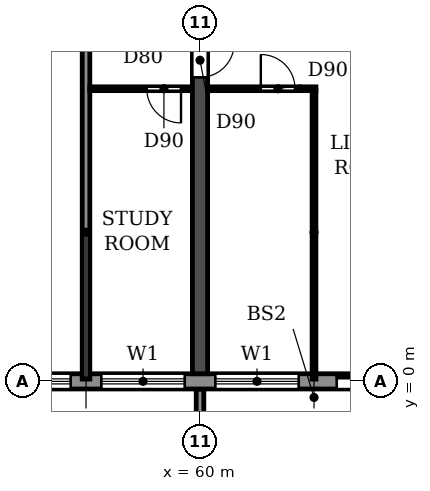
"""IFC4 building model, lengths in metres.
Left out: names, types, materials, properties, quantities, classifications, styles, units other than length and angle.
Written with IfcOpenShell. Run it as: python <this file> out.ifc"""

import sys

from ifc_helpers import new_model, si_unit, direction, frame, frame_2d, origin, place, context, subcontext, project, spatial, polyline, rectangle, outline, extrude, source, transform, mapped, element, fill, save


model = new_model("IFC4")
c1 = context("Model", 3, precision=1e-05, world=origin(), true_north=direction((0.0, 1.0)))
c2 = subcontext(c1, "Body", "Model", "MODEL_VIEW")
j1 = project(units=[si_unit("LENGTHUNIT", "METRE"), si_unit("PLANEANGLEUNIT", "RADIAN")], contexts=[c1])
p1 = place(None, origin())
s1 = spatial("IfcSite", under=j1, at=p1, CompositionType="ELEMENT")
p2 = place(p1, origin())
s2 = spatial("IfcBuilding", under=s1, at=p2, CompositionType="ELEMENT")
p3 = place(p2, frame((0.0, 0.0, 49.8)))
s3 = spatial("IfcBuildingStorey", under=s2, at=p3, CompositionType="ELEMENT", Elevation=49.8)
p4 = place(p3, frame((60.0, 0.2, 0.0), z_axis=(0.0, 0.0, 1.0), x_axis=(0.0, 1.0, 0.0)))
e1 = element("IfcWall", 1, at=p4, inside=s3, PredefinedType="SHEAR", context=c2, shape_type="SweptSolid", body=[
    extrude(rectangle(XDim=11.65, YDim=0.4, at=frame_2d((5.825, 0.0))), origin(), (0.0, 0.0, 1.0), 3.0),
])
p5 = place(p4, frame((7.8, 0.0, 0.0)))
e2 = element("IfcOpeningElement", 2, at=p5, cuts=e1, PredefinedType="OPENING", context=c2, shape_type="SweptSolid", body=[
    extrude(rectangle(XDim=0.9, YDim=2.1, at=frame_2d((0.45, 1.05))), frame((0.0, 0.21, 0.0), z_axis=(0.0, -1.0, 0.0), x_axis=(1.0, 0.0, 0.0)), (0.0, 0.0, 1.0), 0.42),
])
p6 = place(p3, frame((4.683, 0.0, 0.0), z_axis=(0.0, 0.0, 1.0), x_axis=(1.0, 0.0, 0.0)))
e3 = element("IfcWall", 3, at=p6, inside=s3, PredefinedType="STANDARD", context=c2, shape_type="SweptSolid", body=[
    extrude(rectangle(XDim=92.634, YDim=0.4, at=frame_2d((46.317, 0.0))), origin(), (0.0, 0.0, 1.0), 3.0),
])
p7 = place(p6, frame((1.717, 0.0, 0.9)))
e4 = element("IfcOpeningElement", 4, at=p7, cuts=e3, PredefinedType="OPENING", context=c2, shape_type="SweptSolid", body=[
    extrude(rectangle(XDim=2.2, YDim=1.5, at=frame_2d((1.1, 0.75))), frame((0.0, 0.21, 0.0), z_axis=(0.0, -1.0, 0.0), x_axis=(1.0, 0.0, 0.0)), (0.0, 0.0, 1.0), 0.42),
])
p8 = place(p6, frame((4.717, 0.0, 0.9)))
e5 = element("IfcOpeningElement", 5, at=p8, cuts=e3, PredefinedType="OPENING", context=c2, shape_type="SweptSolid", body=[
    extrude(rectangle(XDim=2.2, YDim=1.5, at=frame_2d((1.1, 0.75))), frame((0.0, 0.21, 0.0), z_axis=(0.0, -1.0, 0.0), x_axis=(1.0, 0.0, 0.0)), (0.0, 0.0, 1.0), 0.42),
])
p9 = place(p6, frame((7.717, 0.0, 0.9)))
e6 = element("IfcOpeningElement", 6, at=p9, cuts=e3, PredefinedType="OPENING", context=c2, shape_type="SweptSolid", body=[
    extrude(rectangle(XDim=2.2, YDim=1.5, at=frame_2d((1.1, 0.75))), frame((0.0, 0.21, 0.0), z_axis=(0.0, -1.0, 0.0), x_axis=(1.0, 0.0, 0.0)), (0.0, 0.0, 1.0), 0.42),
])
p10 = place(p6, frame((10.917, 0.0, 0.0)))
e7 = element("IfcOpeningElement", 7, at=p10, cuts=e3, PredefinedType="OPENING", context=c2, shape_type="SweptSolid", body=[
    extrude(rectangle(XDim=1.8, YDim=2.4, at=frame_2d((0.9, 1.2))), frame((0.0, 0.21, 0.0), z_axis=(0.0, -1.0, 0.0), x_axis=(1.0, 0.0, 0.0)), (0.0, 0.0, 1.0), 0.42),
])
p11 = place(p6, frame((13.717, 0.0, 0.9)))
e8 = element("IfcOpeningElement", 8, at=p11, cuts=e3, PredefinedType="OPENING", context=c2, shape_type="SweptSolid", body=[
    extrude(rectangle(XDim=2.2, YDim=1.5, at=frame_2d((1.1, 0.75))), frame((0.0, 0.21, 0.0), z_axis=(0.0, -1.0, 0.0), x_axis=(1.0, 0.0, 0.0)), (0.0, 0.0, 1.0), 0.42),
])
p12 = place(p6, frame((16.717, 0.0, 0.9)))
e9 = element("IfcOpeningElement", 9, at=p12, cuts=e3, PredefinedType="OPENING", context=c2, shape_type="SweptSolid", body=[
    extrude(rectangle(XDim=2.2, YDim=1.5, at=frame_2d((1.1, 0.75))), frame((0.0, 0.21, 0.0), z_axis=(0.0, -1.0, 0.0), x_axis=(1.0, 0.0, 0.0)), (0.0, 0.0, 1.0), 0.42),
])
p13 = place(p6, frame((19.917, 0.0, 0.0)))
e10 = element("IfcOpeningElement", 10, at=p13, cuts=e3, PredefinedType="OPENING", context=c2, shape_type="SweptSolid", body=[
    extrude(rectangle(XDim=1.8, YDim=2.4, at=frame_2d((0.9, 1.2))), frame((0.0, 0.21, 0.0), z_axis=(0.0, -1.0, 0.0), x_axis=(1.0, 0.0, 0.0)), (0.0, 0.0, 1.0), 0.42),
])
p14 = place(p6, frame((22.717, 0.0, 0.9)))
e11 = element("IfcOpeningElement", 11, at=p14, cuts=e3, PredefinedType="OPENING", context=c2, shape_type="SweptSolid", body=[
    extrude(rectangle(XDim=2.2, YDim=1.5, at=frame_2d((1.1, 0.75))), frame((0.0, 0.21, 0.0), z_axis=(0.0, -1.0, 0.0), x_axis=(1.0, 0.0, 0.0)), (0.0, 0.0, 1.0), 0.42),
])
p15 = place(p6, frame((25.717, 0.0, 0.9)))
e12 = element("IfcOpeningElement", 12, at=p15, cuts=e3, PredefinedType="OPENING", context=c2, shape_type="SweptSolid", body=[
    extrude(rectangle(XDim=2.2, YDim=1.5, at=frame_2d((1.1, 0.75))), frame((0.0, 0.21, 0.0), z_axis=(0.0, -1.0, 0.0), x_axis=(1.0, 0.0, 0.0)), (0.0, 0.0, 1.0), 0.42),
])
p16 = place(p6, frame((28.717, 0.0, 0.9)))
e13 = element("IfcOpeningElement", 13, at=p16, cuts=e3, PredefinedType="OPENING", context=c2, shape_type="SweptSolid", body=[
    extrude(rectangle(XDim=2.2, YDim=1.5, at=frame_2d((1.1, 0.75))), frame((0.0, 0.21, 0.0), z_axis=(0.0, -1.0, 0.0), x_axis=(1.0, 0.0, 0.0)), (0.0, 0.0, 1.0), 0.42),
])
p17 = place(p6, frame((31.717, 0.0, 0.9)))
e14 = element("IfcOpeningElement", 14, at=p17, cuts=e3, PredefinedType="OPENING", context=c2, shape_type="SweptSolid", body=[
    extrude(rectangle(XDim=2.2, YDim=1.5, at=frame_2d((1.1, 0.75))), frame((0.0, 0.21, 0.0), z_axis=(0.0, -1.0, 0.0), x_axis=(1.0, 0.0, 0.0)), (0.0, 0.0, 1.0), 0.42),
])
p18 = place(p6, frame((34.917, 0.0, 0.0)))
e15 = element("IfcOpeningElement", 15, at=p18, cuts=e3, PredefinedType="OPENING", context=c2, shape_type="SweptSolid", body=[
    extrude(rectangle(XDim=1.8, YDim=2.4, at=frame_2d((0.9, 1.2))), frame((0.0, 0.21, 0.0), z_axis=(0.0, -1.0, 0.0), x_axis=(1.0, 0.0, 0.0)), (0.0, 0.0, 1.0), 0.42),
])
p19 = place(p6, frame((37.717, 0.0, 0.9)))
e16 = element("IfcOpeningElement", 16, at=p19, cuts=e3, PredefinedType="OPENING", context=c2, shape_type="SweptSolid", body=[
    extrude(rectangle(XDim=2.2, YDim=1.5, at=frame_2d((1.1, 0.75))), frame((0.0, 0.21, 0.0), z_axis=(0.0, -1.0, 0.0), x_axis=(1.0, 0.0, 0.0)), (0.0, 0.0, 1.0), 0.42),
])
p20 = place(p6, frame((40.717, 0.0, 0.9)))
e17 = element("IfcOpeningElement", 17, at=p20, cuts=e3, PredefinedType="OPENING", context=c2, shape_type="SweptSolid", body=[
    extrude(rectangle(XDim=2.2, YDim=1.5, at=frame_2d((1.1, 0.75))), frame((0.0, 0.21, 0.0), z_axis=(0.0, -1.0, 0.0), x_axis=(1.0, 0.0, 0.0)), (0.0, 0.0, 1.0), 0.42),
])
p21 = place(p6, frame((43.717, 0.0, 0.9)))
e18 = element("IfcOpeningElement", 18, at=p21, cuts=e3, PredefinedType="OPENING", context=c2, shape_type="SweptSolid", body=[
    extrude(rectangle(XDim=2.2, YDim=1.5, at=frame_2d((1.1, 0.75))), frame((0.0, 0.21, 0.0), z_axis=(0.0, -1.0, 0.0), x_axis=(1.0, 0.0, 0.0)), (0.0, 0.0, 1.0), 0.42),
])
p22 = place(p6, frame((46.917, 0.0, 0.0)))
e19 = element("IfcOpeningElement", 19, at=p22, cuts=e3, PredefinedType="OPENING", context=c2, shape_type="SweptSolid", body=[
    extrude(rectangle(XDim=1.8, YDim=2.4, at=frame_2d((0.9, 1.2))), frame((0.0, 0.21, 0.0), z_axis=(0.0, -1.0, 0.0), x_axis=(1.0, 0.0, 0.0)), (0.0, 0.0, 1.0), 0.42),
])
p23 = place(p6, frame((49.717, 0.0, 0.9)))
e20 = element("IfcOpeningElement", 20, at=p23, cuts=e3, PredefinedType="OPENING", context=c2, shape_type="SweptSolid", body=[
    extrude(rectangle(XDim=2.2, YDim=1.5, at=frame_2d((1.1, 0.75))), frame((0.0, 0.21, 0.0), z_axis=(0.0, -1.0, 0.0), x_axis=(1.0, 0.0, 0.0)), (0.0, 0.0, 1.0), 0.42),
])
p24 = place(p6, frame((52.717, 0.0, 0.9)))
e21 = element("IfcOpeningElement", 21, at=p24, cuts=e3, PredefinedType="OPENING", context=c2, shape_type="SweptSolid", body=[
    extrude(rectangle(XDim=2.2, YDim=1.5, at=frame_2d((1.1, 0.75))), frame((0.0, 0.21, 0.0), z_axis=(0.0, -1.0, 0.0), x_axis=(1.0, 0.0, 0.0)), (0.0, 0.0, 1.0), 0.42),
])
p25 = place(p6, frame((55.717, 0.0, 0.9)))
e22 = element("IfcOpeningElement", 22, at=p25, cuts=e3, PredefinedType="OPENING", context=c2, shape_type="SweptSolid", body=[
    extrude(rectangle(XDim=2.2, YDim=1.5, at=frame_2d((1.1, 0.75))), frame((0.0, 0.21, 0.0), z_axis=(0.0, -1.0, 0.0), x_axis=(1.0, 0.0, 0.0)), (0.0, 0.0, 1.0), 0.42),
])
p26 = place(p6, frame((58.917, 0.0, 0.0)))
e23 = element("IfcOpeningElement", 23, at=p26, cuts=e3, PredefinedType="OPENING", context=c2, shape_type="SweptSolid", body=[
    extrude(rectangle(XDim=1.8, YDim=2.4, at=frame_2d((0.9, 1.2))), frame((0.0, 0.21, 0.0), z_axis=(0.0, -1.0, 0.0), x_axis=(1.0, 0.0, 0.0)), (0.0, 0.0, 1.0), 0.42),
])
p27 = place(p6, frame((61.717, 0.0, 0.9)))
e24 = element("IfcOpeningElement", 24, at=p27, cuts=e3, PredefinedType="OPENING", context=c2, shape_type="SweptSolid", body=[
    extrude(rectangle(XDim=2.2, YDim=1.5, at=frame_2d((1.1, 0.75))), frame((0.0, 0.21, 0.0), z_axis=(0.0, -1.0, 0.0), x_axis=(1.0, 0.0, 0.0)), (0.0, 0.0, 1.0), 0.42),
])
p28 = place(p6, frame((64.717, 0.0, 0.9)))
e25 = element("IfcOpeningElement", 25, at=p28, cuts=e3, PredefinedType="OPENING", context=c2, shape_type="SweptSolid", body=[
    extrude(rectangle(XDim=2.2, YDim=1.5, at=frame_2d((1.1, 0.75))), frame((0.0, 0.21, 0.0), z_axis=(0.0, -1.0, 0.0), x_axis=(1.0, 0.0, 0.0)), (0.0, 0.0, 1.0), 0.42),
])
p29 = place(p6, frame((67.717, 0.0, 0.9)))
e26 = element("IfcOpeningElement", 26, at=p29, cuts=e3, PredefinedType="OPENING", context=c2, shape_type="SweptSolid", body=[
    extrude(rectangle(XDim=2.2, YDim=1.5, at=frame_2d((1.1, 0.75))), frame((0.0, 0.21, 0.0), z_axis=(0.0, -1.0, 0.0), x_axis=(1.0, 0.0, 0.0)), (0.0, 0.0, 1.0), 0.42),
])
p30 = place(p6, frame((70.917, 0.0, 0.0)))
e27 = element("IfcOpeningElement", 27, at=p30, cuts=e3, PredefinedType="OPENING", context=c2, shape_type="SweptSolid", body=[
    extrude(rectangle(XDim=1.8, YDim=2.4, at=frame_2d((0.9, 1.2))), frame((0.0, 0.21, 0.0), z_axis=(0.0, -1.0, 0.0), x_axis=(1.0, 0.0, 0.0)), (0.0, 0.0, 1.0), 0.42),
])
p31 = place(p6, frame((73.717, 0.0, 0.9)))
e28 = element("IfcOpeningElement", 28, at=p31, cuts=e3, PredefinedType="OPENING", context=c2, shape_type="SweptSolid", body=[
    extrude(rectangle(XDim=2.2, YDim=1.5, at=frame_2d((1.1, 0.75))), frame((0.0, 0.21, 0.0), z_axis=(0.0, -1.0, 0.0), x_axis=(1.0, 0.0, 0.0)), (0.0, 0.0, 1.0), 0.42),
])
p32 = place(p6, frame((76.717, 0.0, 0.9)))
e29 = element("IfcOpeningElement", 29, at=p32, cuts=e3, PredefinedType="OPENING", context=c2, shape_type="SweptSolid", body=[
    extrude(rectangle(XDim=2.2, YDim=1.5, at=frame_2d((1.1, 0.75))), frame((0.0, 0.21, 0.0), z_axis=(0.0, -1.0, 0.0), x_axis=(1.0, 0.0, 0.0)), (0.0, 0.0, 1.0), 0.42),
])
p33 = place(p6, frame((79.717, 0.0, 0.9)))
e30 = element("IfcOpeningElement", 30, at=p33, cuts=e3, PredefinedType="OPENING", context=c2, shape_type="SweptSolid", body=[
    extrude(rectangle(XDim=2.2, YDim=1.5, at=frame_2d((1.1, 0.75))), frame((0.0, 0.21, 0.0), z_axis=(0.0, -1.0, 0.0), x_axis=(1.0, 0.0, 0.0)), (0.0, 0.0, 1.0), 0.42),
])
p34 = place(p6, frame((82.917, 0.0, 0.0)))
e31 = element("IfcOpeningElement", 31, at=p34, cuts=e3, PredefinedType="OPENING", context=c2, shape_type="SweptSolid", body=[
    extrude(rectangle(XDim=1.8, YDim=2.4, at=frame_2d((0.9, 1.2))), frame((0.0, 0.21, 0.0), z_axis=(0.0, -1.0, 0.0), x_axis=(1.0, 0.0, 0.0)), (0.0, 0.0, 1.0), 0.42),
])
p35 = place(p6, frame((85.717, 0.0, 0.9)))
e32 = element("IfcOpeningElement", 32, at=p35, cuts=e3, PredefinedType="OPENING", context=c2, shape_type="SweptSolid", body=[
    extrude(rectangle(XDim=2.2, YDim=1.5, at=frame_2d((1.1, 0.75))), frame((0.0, 0.21, 0.0), z_axis=(0.0, -1.0, 0.0), x_axis=(1.0, 0.0, 0.0)), (0.0, 0.0, 1.0), 0.42),
])
p36 = place(p6, frame((88.717, 0.0, 0.9)))
e33 = element("IfcOpeningElement", 33, at=p36, cuts=e3, PredefinedType="OPENING", context=c2, shape_type="SweptSolid", body=[
    extrude(rectangle(XDim=2.2, YDim=1.5, at=frame_2d((1.1, 0.75))), frame((0.0, 0.21, 0.0), z_axis=(0.0, -1.0, 0.0), x_axis=(1.0, 0.0, 0.0)), (0.0, 0.0, 1.0), 0.42),
])
m1 = source(origin(), c2, "Body", "SweptSolid", [
    extrude(outline(polyline([(0.0, 0.0), (0.2, 0.0), (0.2, 1.65), (0.0, 1.65), (0.0, 0.0)])), origin(), (0.0, 0.0, 1.0), 3.1),
])
p37 = place(p3, frame((59.9, -1.85, 0.0)))
e34 = element("IfcWall", 34, at=p37, inside=s3, PredefinedType="STANDARD", context=c2, shape_type="MappedRepresentation", body=[
    mapped(m1, transform((0.0, 0.0, 0.0))),
])
p38 = place(p3, frame((57.0, 0.06, 0.0), z_axis=(0.0, 0.0, 1.0), x_axis=(0.0, 1.0, 0.0)))
e35 = element("IfcWall", 35, at=p38, inside=s3, PredefinedType="PARTITIONING", context=c2, shape_type="SweptSolid", body=[
    extrude(rectangle(XDim=11.78, YDim=0.2, at=frame_2d((5.89, 0.0))), origin(), (0.0, 0.0, 1.0), 3.0),
])
p39 = place(p3, frame((57.1, 7.7, 0.0), z_axis=(0.0, 0.0, 1.0), x_axis=(1.0, 0.0, 0.0)))
e36 = element("IfcWall", 36, at=p39, inside=s3, PredefinedType="PARTITIONING", context=c2, shape_type="SweptSolid", body=[
    extrude(rectangle(XDim=2.69, YDim=0.1, at=frame_2d((1.345, 0.0))), origin(), (0.0, 0.0, 1.0), 3.0),
])
p40 = place(p39, frame((1.5, 0.0, 0.0)))
e37 = element("IfcOpeningElement", 37, at=p40, cuts=e36, PredefinedType="OPENING", context=c2, shape_type="SweptSolid", body=[
    extrude(rectangle(XDim=0.9, YDim=2.1, at=frame_2d((0.45, 1.05))), frame((0.0, 0.06, 0.0), z_axis=(0.0, -1.0, 0.0), x_axis=(1.0, 0.0, 0.0)), (0.0, 0.0, 1.0), 0.12),
])
p41 = place(p3, frame((60.21, 7.7, 0.0), z_axis=(0.0, 0.0, 1.0), x_axis=(1.0, 0.0, 0.0)))
e38 = element("IfcWall", 38, at=p41, inside=s3, PredefinedType="PARTITIONING", context=c2, shape_type="SweptSolid", body=[
    extrude(rectangle(XDim=2.84, YDim=0.1, at=frame_2d((1.42, 0.0))), origin(), (0.0, 0.0, 1.0), 3.0),
])
p42 = place(p41, frame((1.39, 0.0, 0.0)))
e39 = element("IfcOpeningElement", 39, at=p42, cuts=e38, PredefinedType="OPENING", context=c2, shape_type="SweptSolid", body=[
    extrude(rectangle(XDim=0.9, YDim=2.1, at=frame_2d((0.45, 1.05))), frame((0.0, 0.06, 0.0), z_axis=(0.0, -1.0, 0.0), x_axis=(1.0, 0.0, 0.0)), (0.0, 0.0, 1.0), 0.12),
])
p43 = place(p3, frame((63.0, 0.06, 0.0), z_axis=(0.0, 0.0, 1.0), x_axis=(0.0, 1.0, 0.0)))
e40 = element("IfcWall", 40, at=p43, inside=s3, PredefinedType="PARTITIONING", context=c2, shape_type="SweptSolid", body=[
    extrude(rectangle(XDim=7.59, YDim=0.1, at=frame_2d((3.795, 0.0))), origin(), (0.0, 0.0, 1.0), 3.0),
])
p44 = place(p23, origin())
e41 = element("IfcWindow", 41, at=p44, inside=s3, PartitioningType="DOUBLE_PANEL_HORIZONTAL", PredefinedType="WINDOW", context=c2, shape_type="SweptSolid", body=[
    extrude(rectangle(XDim=2.2, YDim=1.5, at=frame_2d((1.1, 0.75))), frame((0.0, 0.03, 0.0), z_axis=(0.0, -1.0, 0.0), x_axis=(1.0, 0.0, 0.0)), (0.0, 0.0, 1.0), 0.06),
])
fill(e20, e41)
p45 = place(p24, origin())
e42 = element("IfcWindow", 42, at=p45, inside=s3, PartitioningType="DOUBLE_PANEL_HORIZONTAL", PredefinedType="WINDOW", context=c2, shape_type="SweptSolid", body=[
    extrude(rectangle(XDim=2.2, YDim=1.5, at=frame_2d((1.1, 0.75))), frame((0.0, 0.03, 0.0), z_axis=(0.0, -1.0, 0.0), x_axis=(1.0, 0.0, 0.0)), (0.0, 0.0, 1.0), 0.06),
])
fill(e21, e42)
p46 = place(p25, origin())
e43 = element("IfcWindow", 43, at=p46, inside=s3, PartitioningType="DOUBLE_PANEL_HORIZONTAL", PredefinedType="WINDOW", context=c2, shape_type="SweptSolid", body=[
    extrude(rectangle(XDim=2.2, YDim=1.5, at=frame_2d((1.1, 0.75))), frame((0.0, 0.03, 0.0), z_axis=(0.0, -1.0, 0.0), x_axis=(1.0, 0.0, 0.0)), (0.0, 0.0, 1.0), 0.06),
])
fill(e22, e43)
p47 = place(p26, origin())
e44 = element("IfcDoor", 44, at=p47, inside=s3, OperationType="DOUBLE_DOOR_SLIDING", PredefinedType="DOOR", context=c2, shape_type="SweptSolid", body=[
    extrude(rectangle(XDim=1.8, YDim=2.4, at=frame_2d((0.9, 1.2))), frame((0.0, 0.025, 0.0), z_axis=(0.0, -1.0, 0.0), x_axis=(1.0, 0.0, 0.0)), (0.0, 0.0, 1.0), 0.05),
])
fill(e23, e44)
p48 = place(p40, frame((0.9, 0.0, 0.0), z_axis=(0.0, 0.0, 1.0), x_axis=(-1.0, 0.0, 0.0)))
e45 = element("IfcDoor", 45, at=p48, inside=s3, OperationType="SINGLE_SWING_LEFT", PredefinedType="DOOR", context=c2, shape_type="SweptSolid", body=[
    extrude(rectangle(XDim=0.9, YDim=2.1, at=frame_2d((0.45, 1.05))), frame((0.0, 0.025, 0.0), z_axis=(0.0, -1.0, 0.0), x_axis=(1.0, 0.0, 0.0)), (0.0, 0.0, 1.0), 0.05),
])
fill(e37, e45)
p49 = place(p5, frame((0.9, 0.0, 0.0), z_axis=(0.0, 0.0, 1.0), x_axis=(-1.0, 0.0, 0.0)))
e46 = element("IfcDoor", 46, at=p49, inside=s3, OperationType="SINGLE_SWING_LEFT", PredefinedType="DOOR", context=c2, shape_type="SweptSolid", body=[
    extrude(rectangle(XDim=0.9, YDim=2.1, at=frame_2d((0.45, 1.05))), frame((0.0, 0.025, 0.0), z_axis=(0.0, -1.0, 0.0), x_axis=(1.0, 0.0, 0.0)), (0.0, 0.0, 1.0), 0.05),
])
fill(e2, e46)
p50 = place(p42, origin())
e47 = element("IfcDoor", 47, at=p50, inside=s3, OperationType="SINGLE_SWING_LEFT", PredefinedType="DOOR", context=c2, shape_type="SweptSolid", body=[
    extrude(rectangle(XDim=0.9, YDim=2.1, at=frame_2d((0.45, 1.05))), frame((0.0, 0.025, 0.0), z_axis=(0.0, -1.0, 0.0), x_axis=(1.0, 0.0, 0.0)), (0.0, 0.0, 1.0), 0.05),
])
fill(e39, e47)
save(model, sys.argv[1])
